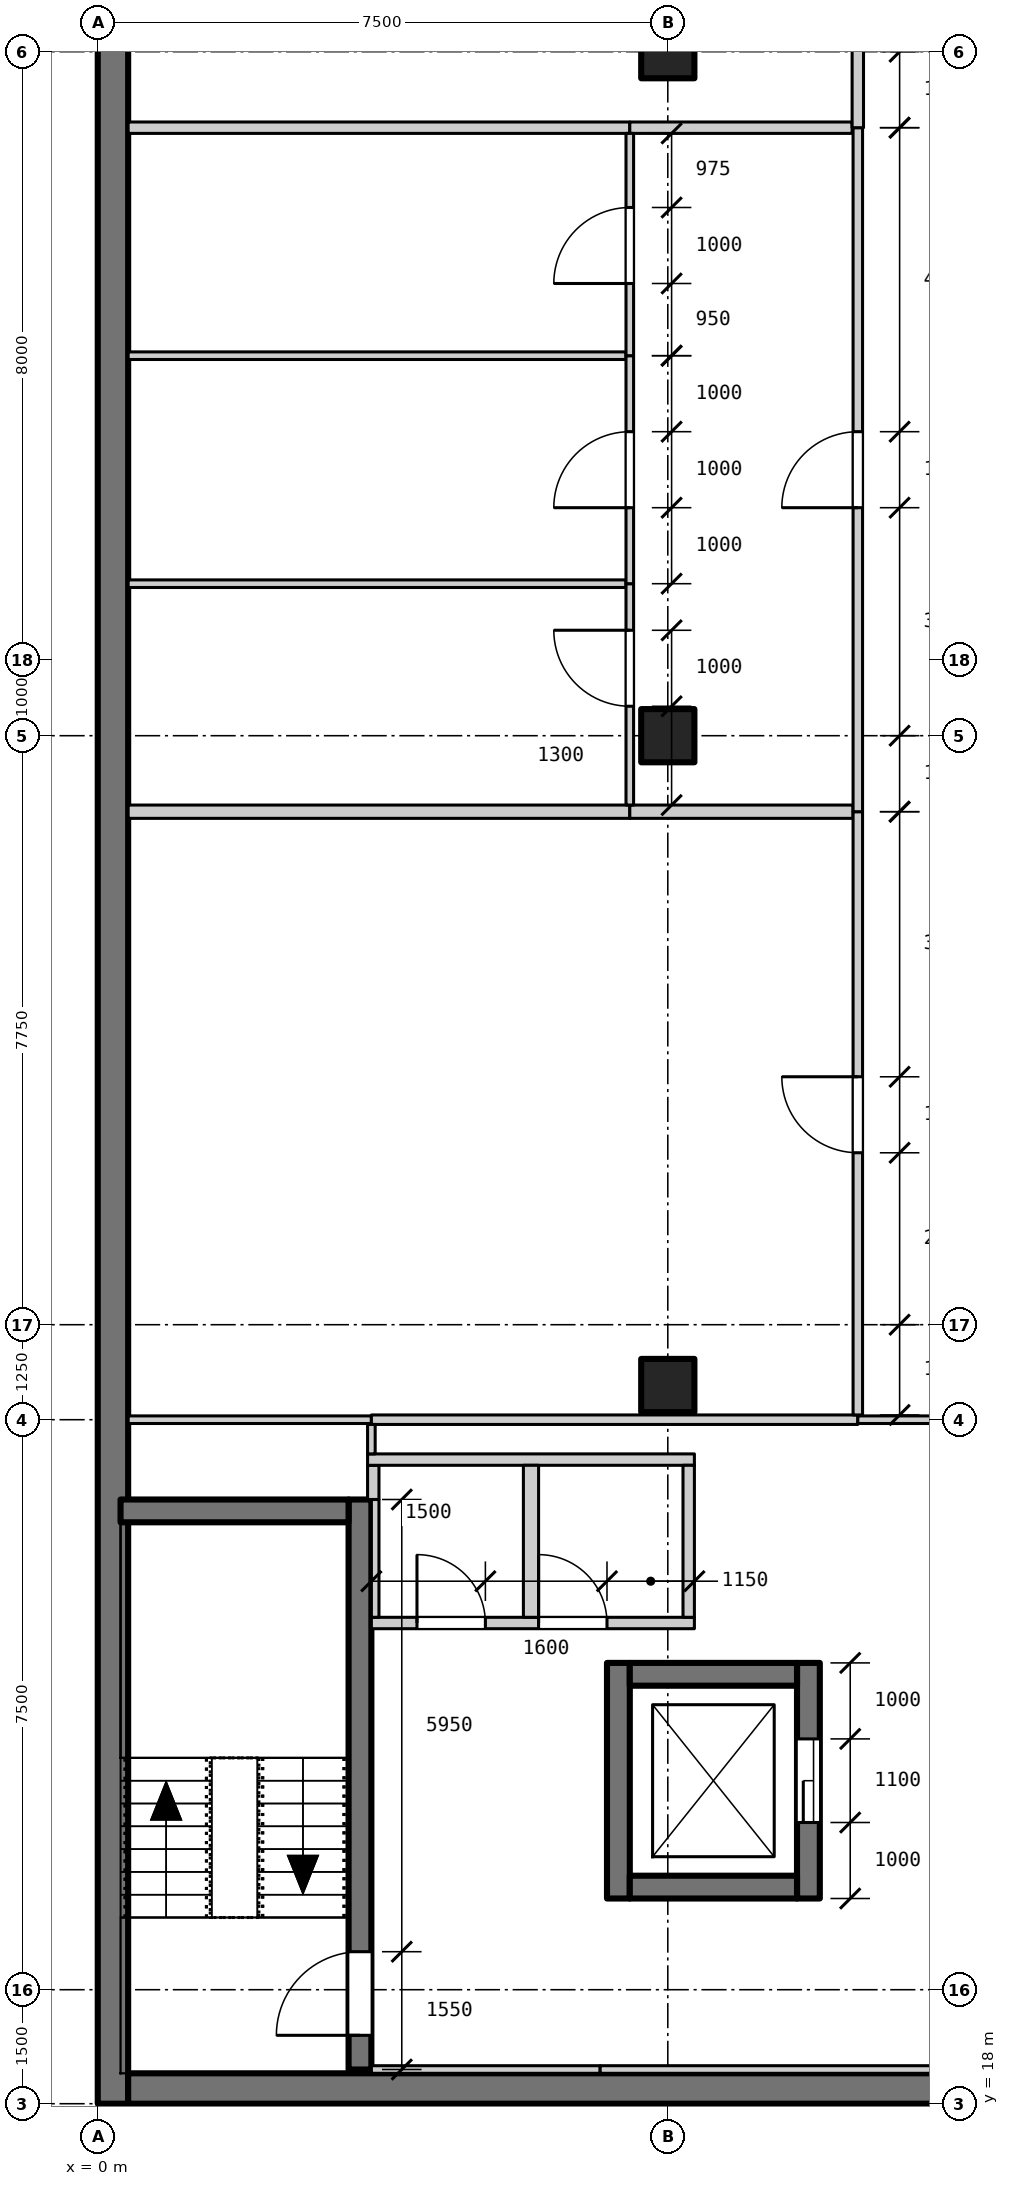
"""IFC4 building model, lengths in metres.
Left out: names, types, materials, properties, quantities, classifications, styles, units other than length and angle.
Written with IfcOpenShell. Run it as: python <this file> out.ifc"""

import sys

from ifc_helpers import new_model, si_unit, direction, frame, frame_2d, origin, origin_2d, place, context, subcontext, project, spatial, rectangle, extrude, element, fill, save


model = new_model("IFC4")
c1 = context("Model", 3, precision=1e-05, world=origin(), true_north=direction((0.0, 1.0)))
c2 = subcontext(c1, "Body", "Model", "MODEL_VIEW")
j1 = project(units=[si_unit("LENGTHUNIT", "METRE"), si_unit("PLANEANGLEUNIT", "RADIAN")], contexts=[c1])
p1 = place(None, origin())
s1 = spatial("IfcSite", under=j1, at=p1, CompositionType="ELEMENT")
p2 = place(p1, origin())
s2 = spatial("IfcBuilding", under=s1, at=p2, CompositionType="ELEMENT")
p3 = place(p2, frame((0.0, 0.0, -10.0)))
s3 = spatial("IfcBuildingStorey", under=s2, at=p3, CompositionType="ELEMENT", Elevation=-10.0)
for number, where, z_axis, x_axis in (
    (1, (7.5, 27.45, -1.4), (0.0, 0.0, 1.0), (1.0, 0.0, 0.0)),
    (2, (7.5, 36.0, -1.4), (0.0, 0.0, 1.0), (1.0, 0.0, 0.0)),
    (3, (7.5, 45.0, -1.4), (0.0, 0.0, 1.0), (1.0, 0.0, 0.0)),
):
    element("IfcColumn", number, at=place(p3, frame(where, z_axis=z_axis, x_axis=x_axis)), inside=s3, PredefinedType="COLUMN", context=c2, shape_type="SweptSolid", body=[
        extrude(rectangle(XDim=0.7, YDim=0.7, at=origin_2d()), origin(), (0.0, 0.0, 1.0), 6.4),
    ])
p4 = place(p3, frame((0.2, 18.0, -1.4), z_axis=(0.0, 0.0, 1.0), x_axis=(0.0, 1.0, 0.0)))
e4 = element("IfcWall", 4, at=p4, inside=s3, PredefinedType="SOLIDWALL", context=c2, shape_type="SweptSolid", body=[
    extrude(rectangle(XDim=108.0, YDim=0.4, at=frame_2d((54.0, 0.0))), origin(), (0.0, 0.0, 1.0), 6.4),
])
p5 = place(p3, frame((0.4, 18.2, -1.4), z_axis=(0.0, 0.0, 1.0), x_axis=(1.0, 0.0, 0.0)))
e5 = element("IfcWall", 5, at=p5, inside=s3, PredefinedType="SOLIDWALL", context=c2, shape_type="SweptSolid", body=[
    extrude(rectangle(XDim=57.2, YDim=0.4, at=frame_2d((28.6, 0.0))), origin(), (0.0, 0.0, 1.0), 6.4),
])
p6 = place(p3, frame((3.45, 18.45, 0.0), z_axis=(0.0, 0.0, 1.0), x_axis=(0.0, 1.0, 0.0)))
e6 = element("IfcWall", 6, at=p6, inside=s3, PredefinedType="SHEAR", context=c2, shape_type="SweptSolid", body=[
    extrude(rectangle(XDim=7.5, YDim=0.3, at=frame_2d((3.75, 0.0))), origin(), (0.0, 0.0, 1.0), 5.0),
])
p7 = place(p6, frame((0.45, 0.0, 0.0)))
e7 = element("IfcOpeningElement", 7, at=p7, cuts=e6, PredefinedType="OPENING", context=c2, shape_type="SweptSolid", body=[
    extrude(rectangle(XDim=1.1, YDim=2.1, at=frame_2d((0.55, 1.05))), frame((0.0, 0.16, 0.0), z_axis=(0.0, -1.0, 0.0), x_axis=(1.0, 0.0, 0.0)), (0.0, 0.0, 1.0), 0.32),
])
p8 = place(p3, frame((0.3, 25.8, 0.0), z_axis=(0.0, 0.0, 1.0), x_axis=(1.0, 0.0, 0.0)))
e8 = element("IfcWall", 8, at=p8, inside=s3, PredefinedType="SHEAR", context=c2, shape_type="SweptSolid", body=[
    extrude(rectangle(XDim=3.0, YDim=0.3, at=frame_2d((1.5, 0.0))), origin(), (0.0, 0.0, 1.0), 5.0),
])
p9 = place(p3, frame((6.85, 20.7, -1.4), z_axis=(0.0, 0.0, 1.0), x_axis=(0.0, 1.0, 0.0)))
e9 = element("IfcWall", 9, at=p9, inside=s3, PredefinedType="SHEAR", context=c2, shape_type="SweptSolid", body=[
    extrude(rectangle(XDim=3.1, YDim=0.3, at=frame_2d((1.55, 0.0))), origin(), (0.0, 0.0, 1.0), 6.4),
])
p10 = place(p3, frame((9.35, 20.7, -1.4), z_axis=(0.0, 0.0, 1.0), x_axis=(0.0, 1.0, 0.0)))
e10 = element("IfcWall", 10, at=p10, inside=s3, PredefinedType="SHEAR", context=c2, shape_type="SweptSolid", body=[
    extrude(rectangle(XDim=3.1, YDim=0.3, at=frame_2d((1.55, 0.0))), origin(), (0.0, 0.0, 1.0), 6.4),
])
p11 = place(p10, frame((1.0, 0.0, 1.4)))
e11 = element("IfcOpeningElement", 11, at=p11, cuts=e10, PredefinedType="OPENING", context=c2, shape_type="SweptSolid", body=[
    extrude(rectangle(XDim=1.1, YDim=2.1, at=frame_2d((0.55, 1.05))), frame((0.0, 0.16, 0.0), z_axis=(0.0, -1.0, 0.0), x_axis=(1.0, 0.0, 0.0)), (0.0, 0.0, 1.0), 0.32),
])
for number, where, z_axis, x_axis in (
    (12, (7.0, 20.85, -1.4), (0.0, 0.0, 1.0), (1.0, 0.0, 0.0)),
    (13, (7.0, 23.65, -1.4), (0.0, 0.0, 1.0), (1.0, 0.0, 0.0)),
):
    element("IfcWall", number, at=place(p3, frame(where, z_axis=z_axis, x_axis=x_axis)), inside=s3, PredefinedType="SHEAR", context=c2, shape_type="SweptSolid", body=[
        extrude(rectangle(XDim=2.2, YDim=0.3, at=frame_2d((1.1, 0.0))), origin(), (0.0, 0.0, 1.0), 6.4),
    ])
p12 = place(p3, frame((3.625, 25.95, 0.0), z_axis=(0.0, 0.0, 1.0), x_axis=(0.0, 1.0, 0.0)))
e14 = element("IfcWall", 14, at=p12, inside=s3, PredefinedType="PARTITIONING", context=c2, shape_type="SweptSolid", body=[
    extrude(rectangle(XDim=0.45, YDim=0.15, at=frame_2d((0.225, 0.0))), origin(), (0.0, 0.0, 1.0), 4.75),
])
p13 = place(p3, frame((3.55, 26.475, 0.0), z_axis=(0.0, 0.0, 1.0), x_axis=(1.0, 0.0, 0.0)))
e15 = element("IfcWall", 15, at=p13, inside=s3, PredefinedType="PARTITIONING", context=c2, shape_type="SweptSolid", body=[
    extrude(rectangle(XDim=4.3, YDim=0.15, at=frame_2d((2.15, 0.0))), origin(), (0.0, 0.0, 1.0), 3.35),
])
p14 = place(p3, frame((3.6, 24.325, 0.0), z_axis=(0.0, 0.0, 1.0), x_axis=(1.0, 0.0, 0.0)))
e16 = element("IfcWall", 16, at=p14, inside=s3, PredefinedType="PARTITIONING", context=c2, shape_type="SweptSolid", body=[
    extrude(rectangle(XDim=4.25, YDim=0.15, at=frame_2d((2.125, 0.0))), origin(), (0.0, 0.0, 1.0), 4.75),
])
p15 = place(p14, frame((0.6, 0.0, 0.0)))
e17 = element("IfcOpeningElement", 17, at=p15, cuts=e16, PredefinedType="OPENING", context=c2, shape_type="SweptSolid", body=[
    extrude(rectangle(XDim=0.9, YDim=2.1, at=frame_2d((0.45, 1.05))), frame((0.0, 0.085, 0.0), z_axis=(0.0, -1.0, 0.0), x_axis=(1.0, 0.0, 0.0)), (0.0, 0.0, 1.0), 0.17),
])
p16 = place(p14, frame((2.2, 0.0, 0.0)))
e18 = element("IfcOpeningElement", 18, at=p16, cuts=e16, PredefinedType="OPENING", context=c2, shape_type="SweptSolid", body=[
    extrude(rectangle(XDim=0.9, YDim=2.1, at=frame_2d((0.45, 1.05))), frame((0.0, 0.085, 0.0), z_axis=(0.0, -1.0, 0.0), x_axis=(1.0, 0.0, 0.0)), (0.0, 0.0, 1.0), 0.17),
])
p17 = place(p3, frame((3.65, 24.4, 0.0), z_axis=(0.0, 0.0, 1.0), x_axis=(0.0, 1.0, 0.0)))
e19 = element("IfcWall", 19, at=p17, inside=s3, PredefinedType="PARTITIONING", context=c2, shape_type="SweptSolid", body=[
    extrude(rectangle(XDim=1.55, YDim=0.1, at=frame_2d((0.775, 0.0))), origin(), (0.0, 0.0, 1.0), 4.75),
])
p18 = place(p3, frame((5.7, 24.4, 0.0), z_axis=(0.0, 0.0, 1.0), x_axis=(0.0, 1.0, 0.0)))
e20 = element("IfcWall", 20, at=p18, inside=s3, PredefinedType="PARTITIONING", context=c2, shape_type="SweptSolid", body=[
    extrude(rectangle(XDim=2.0, YDim=0.2, at=frame_2d((1.0, 0.0))), origin(), (0.0, 0.0, 1.0), 4.75),
])
p19 = place(p3, frame((7.775, 24.4, 0.0), z_axis=(0.0, 0.0, 1.0), x_axis=(0.0, 1.0, 0.0)))
e21 = element("IfcWall", 21, at=p19, inside=s3, PredefinedType="PARTITIONING", context=c2, shape_type="SweptSolid", body=[
    extrude(rectangle(XDim=2.0, YDim=0.15, at=frame_2d((1.0, 0.0))), origin(), (0.0, 0.0, 1.0), 4.75),
])
p20 = place(p3, frame((3.6, 18.45, 0.0), z_axis=(0.0, 0.0, 1.0), x_axis=(1.0, 0.0, 0.0)))
e22 = element("IfcWall", 22, at=p20, inside=s3, PredefinedType="PARTITIONING", context=c2, shape_type="SweptSolid", body=[
    extrude(rectangle(XDim=3.01, YDim=0.1, at=frame_2d((1.505, 0.0))), origin(), (0.0, 0.0, 1.0), 4.75),
])
p21 = place(p3, frame((6.61, 18.45, 0.0), z_axis=(0.0, 0.0, 1.0), x_axis=(1.0, 0.0, 0.0)))
e23 = element("IfcWall", 23, at=p21, inside=s3, PredefinedType="PARTITIONING", context=c2, shape_type="SweptSolid", body=[
    extrude(rectangle(XDim=8.09, YDim=0.1, at=frame_2d((4.045, 0.0))), origin(), (0.0, 0.0, 1.0), 4.75),
])
p22 = place(p3, frame((0.4, 27.0, 0.0), z_axis=(0.0, 0.0, 1.0), x_axis=(1.0, 0.0, 0.0)))
e24 = element("IfcWall", 24, at=p22, inside=s3, PredefinedType="PARTITIONING", context=c2, shape_type="SweptSolid", body=[
    extrude(rectangle(XDim=3.2, YDim=0.1, at=frame_2d((1.6, 0.0))), origin(), (0.0, 0.0, 1.0), 4.75),
])
p23 = place(p3, frame((3.6, 27.0, 0.0), z_axis=(0.0, 0.0, 1.0), x_axis=(1.0, 0.0, 0.0)))
e25 = element("IfcWall", 25, at=p23, inside=s3, PredefinedType="PARTITIONING", context=c2, shape_type="SweptSolid", body=[
    extrude(rectangle(XDim=6.4, YDim=0.125, at=frame_2d((3.2, 0.0))), origin(), (0.0, 0.0, 1.0), 4.75),
])
p24 = place(p3, frame((10.0, 27.0, 0.0), z_axis=(0.0, 0.0, 1.0), x_axis=(1.0, 0.0, 0.0)))
e26 = element("IfcWall", 26, at=p24, inside=s3, PredefinedType="PARTITIONING", context=c2, shape_type="SweptSolid", body=[
    extrude(rectangle(XDim=2.65, YDim=0.1, at=frame_2d((1.325, 0.0))), origin(), (0.0, 0.0, 1.0), 4.75),
])
p25 = place(p3, frame((0.4, 35.0, 0.0), z_axis=(0.0, 0.0, 1.0), x_axis=(1.0, 0.0, 0.0)))
e27 = element("IfcWall", 27, at=p25, inside=s3, PredefinedType="PARTITIONING", context=c2, shape_type="SweptSolid", body=[
    extrude(rectangle(XDim=6.6, YDim=0.175, at=frame_2d((3.3, 0.0))), origin(), (0.0, 0.0, 1.0), 4.75),
])
p26 = place(p3, frame((7.0, 35.0, 0.0), z_axis=(0.0, 0.0, 1.0), x_axis=(1.0, 0.0, 0.0)))
e28 = element("IfcWall", 28, at=p26, inside=s3, PredefinedType="PARTITIONING", context=c2, shape_type="SweptSolid", body=[
    extrude(rectangle(XDim=2.938, YDim=0.175, at=frame_2d((1.469, 0.0))), origin(), (0.0, 0.0, 1.0), 4.75),
])
for number, where, z_axis, x_axis in (
    (29, (0.4, 38.0, 0.0), (0.0, 0.0, 1.0), (1.0, 0.0, 0.0)),
    (30, (0.4, 41.0, 0.0), (0.0, 0.0, 1.0), (1.0, 0.0, 0.0)),
):
    element("IfcWall", number, at=place(p3, frame(where, z_axis=z_axis, x_axis=x_axis)), inside=s3, PredefinedType="PARTITIONING", context=c2, shape_type="SweptSolid", body=[
        extrude(rectangle(XDim=6.55, YDim=0.1, at=frame_2d((3.275, 0.0))), origin(), (0.0, 0.0, 1.0), 4.75),
    ])
p27 = place(p3, frame((0.4, 44.0, 0.0), z_axis=(0.0, 0.0, 1.0), x_axis=(1.0, 0.0, 0.0)))
e31 = element("IfcWall", 31, at=p27, inside=s3, PredefinedType="PARTITIONING", context=c2, shape_type="SweptSolid", body=[
    extrude(rectangle(XDim=6.6, YDim=0.15, at=frame_2d((3.3, 0.0))), origin(), (0.0, 0.0, 1.0), 4.75),
])
p28 = place(p3, frame((7.0, 44.0, 0.0), z_axis=(0.0, 0.0, 1.0), x_axis=(1.0, 0.0, 0.0)))
e32 = element("IfcWall", 32, at=p28, inside=s3, PredefinedType="PARTITIONING", context=c2, shape_type="SweptSolid", body=[
    extrude(rectangle(XDim=2.925, YDim=0.15, at=frame_2d((1.462, 0.0))), origin(), (0.0, 0.0, 1.0), 4.75),
])
p29 = place(p3, frame((3.6, 26.55, 0.0), z_axis=(0.0, 0.0, 1.0), x_axis=(0.0, 1.0, 0.0)))
e33 = element("IfcWall", 33, at=p29, inside=s3, PredefinedType="PARTITIONING", context=c2, shape_type="SweptSolid", body=[
    extrude(rectangle(XDim=0.387, YDim=0.1, at=frame_2d((0.194, 0.0))), origin(), (0.0, 0.0, 1.0), 4.75),
])
p30 = place(p3, frame((7.0, 35.087, 0.0), z_axis=(0.0, 0.0, 1.0), x_axis=(0.0, 1.0, 0.0)))
e34 = element("IfcWall", 34, at=p30, inside=s3, PredefinedType="PARTITIONING", context=c2, shape_type="SweptSolid", body=[
    extrude(rectangle(XDim=2.913, YDim=0.1, at=frame_2d((1.456, 0.0))), origin(), (0.0, 0.0, 1.0), 4.75),
])
p31 = place(p30, frame((1.3, 0.0, 0.0)))
e35 = element("IfcOpeningElement", 35, at=p31, cuts=e34, PredefinedType="OPENING", context=c2, shape_type="SweptSolid", body=[
    extrude(rectangle(XDim=1.0, YDim=2.1, at=frame_2d((0.5, 1.05))), frame((0.0, 0.06, 0.0), z_axis=(0.0, -1.0, 0.0), x_axis=(1.0, 0.0, 0.0)), (0.0, 0.0, 1.0), 0.12),
])
p32 = place(p3, frame((7.0, 38.0, 0.0), z_axis=(0.0, 0.0, 1.0), x_axis=(0.0, 1.0, 0.0)))
e36 = element("IfcWall", 36, at=p32, inside=s3, PredefinedType="PARTITIONING", context=c2, shape_type="SweptSolid", body=[
    extrude(rectangle(XDim=3.0, YDim=0.1, at=frame_2d((1.5, 0.0))), origin(), (0.0, 0.0, 1.0), 4.75),
])
p33 = place(p32, frame((1.0, 0.0, 0.0)))
e37 = element("IfcOpeningElement", 37, at=p33, cuts=e36, PredefinedType="OPENING", context=c2, shape_type="SweptSolid", body=[
    extrude(rectangle(XDim=1.0, YDim=2.1, at=frame_2d((0.5, 1.05))), frame((0.0, 0.06, 0.0), z_axis=(0.0, -1.0, 0.0), x_axis=(1.0, 0.0, 0.0)), (0.0, 0.0, 1.0), 0.12),
])
p34 = place(p3, frame((7.0, 41.0, 0.0), z_axis=(0.0, 0.0, 1.0), x_axis=(0.0, 1.0, 0.0)))
e38 = element("IfcWall", 38, at=p34, inside=s3, PredefinedType="PARTITIONING", context=c2, shape_type="SweptSolid", body=[
    extrude(rectangle(XDim=2.925, YDim=0.1, at=frame_2d((1.462, 0.0))), origin(), (0.0, 0.0, 1.0), 4.75),
])
p35 = place(p34, frame((0.95, 0.0, 0.0)))
e39 = element("IfcOpeningElement", 39, at=p35, cuts=e38, PredefinedType="OPENING", context=c2, shape_type="SweptSolid", body=[
    extrude(rectangle(XDim=1.0, YDim=2.1, at=frame_2d((0.5, 1.05))), frame((0.0, 0.06, 0.0), z_axis=(0.0, -1.0, 0.0), x_axis=(1.0, 0.0, 0.0)), (0.0, 0.0, 1.0), 0.12),
])
p36 = place(p3, frame((10.0, 27.062, 0.0), z_axis=(0.0, 0.0, 1.0), x_axis=(0.0, 1.0, 0.0)))
e40 = element("IfcWall", 40, at=p36, inside=s3, PredefinedType="PARTITIONING", context=c2, shape_type="SweptSolid", body=[
    extrude(rectangle(XDim=7.938, YDim=0.125, at=frame_2d((3.969, 0.0))), origin(), (0.0, 0.0, 1.0), 4.75),
])
p37 = place(p36, frame((3.45, 0.0, 0.0)))
e41 = element("IfcOpeningElement", 41, at=p37, cuts=e40, PredefinedType="OPENING", context=c2, shape_type="SweptSolid", body=[
    extrude(rectangle(XDim=1.0, YDim=2.1, at=frame_2d((0.5, 1.05))), frame((0.0, 0.073, 0.0), z_axis=(0.0, -1.0, 0.0), x_axis=(1.0, 0.0, 0.0)), (0.0, 0.0, 1.0), 0.145),
])
p38 = place(p3, frame((10.0, 35.0, 0.0), z_axis=(0.0, 0.0, 1.0), x_axis=(0.0, 1.0, 0.0)))
e42 = element("IfcWall", 42, at=p38, inside=s3, PredefinedType="PARTITIONING", context=c2, shape_type="SweptSolid", body=[
    extrude(rectangle(XDim=9.0, YDim=0.125, at=frame_2d((4.5, 0.0))), origin(), (0.0, 0.0, 1.0), 4.75),
])
p39 = place(p38, frame((4.0, 0.0, 0.0)))
e43 = element("IfcOpeningElement", 43, at=p39, cuts=e42, PredefinedType="OPENING", context=c2, shape_type="SweptSolid", body=[
    extrude(rectangle(XDim=1.0, YDim=2.1, at=frame_2d((0.5, 1.05))), frame((0.0, 0.073, 0.0), z_axis=(0.0, -1.0, 0.0), x_axis=(1.0, 0.0, 0.0)), (0.0, 0.0, 1.0), 0.145),
])
p40 = place(p3, frame((10.0, 44.0, 0.0), z_axis=(0.0, 0.0, 1.0), x_axis=(0.0, 1.0, 0.0)))
e44 = element("IfcWall", 44, at=p40, inside=s3, PredefinedType="PARTITIONING", context=c2, shape_type="SweptSolid", body=[
    extrude(rectangle(XDim=10.0, YDim=0.15, at=frame_2d((5.0, 0.0))), origin(), (0.0, 0.0, 1.0), 4.75),
])
p41 = place(p40, frame((4.0, 0.0, 0.0)))
e45 = element("IfcOpeningElement", 45, at=p41, cuts=e44, PredefinedType="OPENING", context=c2, shape_type="SweptSolid", body=[
    extrude(rectangle(XDim=2.0, YDim=2.1, at=frame_2d((1.0, 1.05))), frame((0.0, 0.085, 0.0), z_axis=(0.0, -1.0, 0.0), x_axis=(1.0, 0.0, 0.0)), (0.0, 0.0, 1.0), 0.17),
])
p42 = place(p15, origin())
e46 = element("IfcDoor", 46, at=p42, inside=s3, OperationType="SINGLE_SWING_LEFT", PredefinedType="DOOR", context=c2, shape_type="SweptSolid", body=[
    extrude(rectangle(XDim=0.9, YDim=2.1, at=frame_2d((0.45, 1.05))), frame((0.0, 0.025, 0.0), z_axis=(0.0, -1.0, 0.0), x_axis=(1.0, 0.0, 0.0)), (0.0, 0.0, 1.0), 0.05),
])
fill(e17, e46)
p43 = place(p16, origin())
e47 = element("IfcDoor", 47, at=p43, inside=s3, OperationType="SINGLE_SWING_LEFT", PredefinedType="DOOR", context=c2, shape_type="SweptSolid", body=[
    extrude(rectangle(XDim=0.9, YDim=2.1, at=frame_2d((0.45, 1.05))), frame((0.0, 0.025, 0.0), z_axis=(0.0, -1.0, 0.0), x_axis=(1.0, 0.0, 0.0)), (0.0, 0.0, 1.0), 0.05),
])
fill(e18, e47)
p44 = place(p37, origin())
e48 = element("IfcDoor", 48, at=p44, inside=s3, OperationType="SINGLE_SWING_RIGHT", PredefinedType="DOOR", context=c2, shape_type="SweptSolid", body=[
    extrude(rectangle(XDim=1.0, YDim=2.1, at=frame_2d((0.5, 1.05))), frame((0.0, 0.025, 0.0), z_axis=(0.0, -1.0, 0.0), x_axis=(1.0, 0.0, 0.0)), (0.0, 0.0, 1.0), 0.05),
])
fill(e41, e48)
p45 = place(p31, origin())
e49 = element("IfcDoor", 49, at=p45, inside=s3, OperationType="SINGLE_SWING_RIGHT", PredefinedType="DOOR", context=c2, shape_type="SweptSolid", body=[
    extrude(rectangle(XDim=1.0, YDim=2.1, at=frame_2d((0.5, 1.05))), frame((0.0, 0.025, 0.0), z_axis=(0.0, -1.0, 0.0), x_axis=(1.0, 0.0, 0.0)), (0.0, 0.0, 1.0), 0.05),
])
fill(e35, e49)
p46 = place(p33, origin())
e50 = element("IfcDoor", 50, at=p46, inside=s3, OperationType="SINGLE_SWING_LEFT", PredefinedType="DOOR", context=c2, shape_type="SweptSolid", body=[
    extrude(rectangle(XDim=1.0, YDim=2.1, at=frame_2d((0.5, 1.05))), frame((0.0, 0.025, 0.0), z_axis=(0.0, -1.0, 0.0), x_axis=(1.0, 0.0, 0.0)), (0.0, 0.0, 1.0), 0.05),
])
fill(e37, e50)
p47 = place(p39, origin())
e51 = element("IfcDoor", 51, at=p47, inside=s3, OperationType="SINGLE_SWING_LEFT", PredefinedType="DOOR", context=c2, shape_type="SweptSolid", body=[
    extrude(rectangle(XDim=1.0, YDim=2.1, at=frame_2d((0.5, 1.05))), frame((0.0, 0.025, 0.0), z_axis=(0.0, -1.0, 0.0), x_axis=(1.0, 0.0, 0.0)), (0.0, 0.0, 1.0), 0.05),
])
fill(e43, e51)
p48 = place(p35, origin())
e52 = element("IfcDoor", 52, at=p48, inside=s3, OperationType="SINGLE_SWING_LEFT", PredefinedType="DOOR", context=c2, shape_type="SweptSolid", body=[
    extrude(rectangle(XDim=1.0, YDim=2.1, at=frame_2d((0.5, 1.05))), frame((0.0, 0.025, 0.0), z_axis=(0.0, -1.0, 0.0), x_axis=(1.0, 0.0, 0.0)), (0.0, 0.0, 1.0), 0.05),
])
fill(e39, e52)
p49 = place(p7, origin())
e53 = element("IfcDoor", 53, at=p49, inside=s3, OperationType="SINGLE_SWING_LEFT", PredefinedType="DOOR", context=c2, shape_type="SweptSolid", body=[
    extrude(rectangle(XDim=1.1, YDim=2.1, at=frame_2d((0.55, 1.05))), frame((0.0, 0.025, 0.0), z_axis=(0.0, -1.0, 0.0), x_axis=(1.0, 0.0, 0.0)), (0.0, 0.0, 1.0), 0.05),
])
fill(e7, e53)
p50 = place(p11, origin())
e54 = element("IfcDoor", 54, at=p50, inside=s3, OperationType="SLIDING_TO_LEFT", PredefinedType="DOOR", context=c2, shape_type="SweptSolid", body=[
    extrude(rectangle(XDim=1.1, YDim=2.1, at=frame_2d((0.55, 1.05))), frame((0.0, 0.025, 0.0), z_axis=(0.0, -1.0, 0.0), x_axis=(1.0, 0.0, 0.0)), (0.0, 0.0, 1.0), 0.05),
])
fill(e11, e54)
save(model, sys.argv[1])
